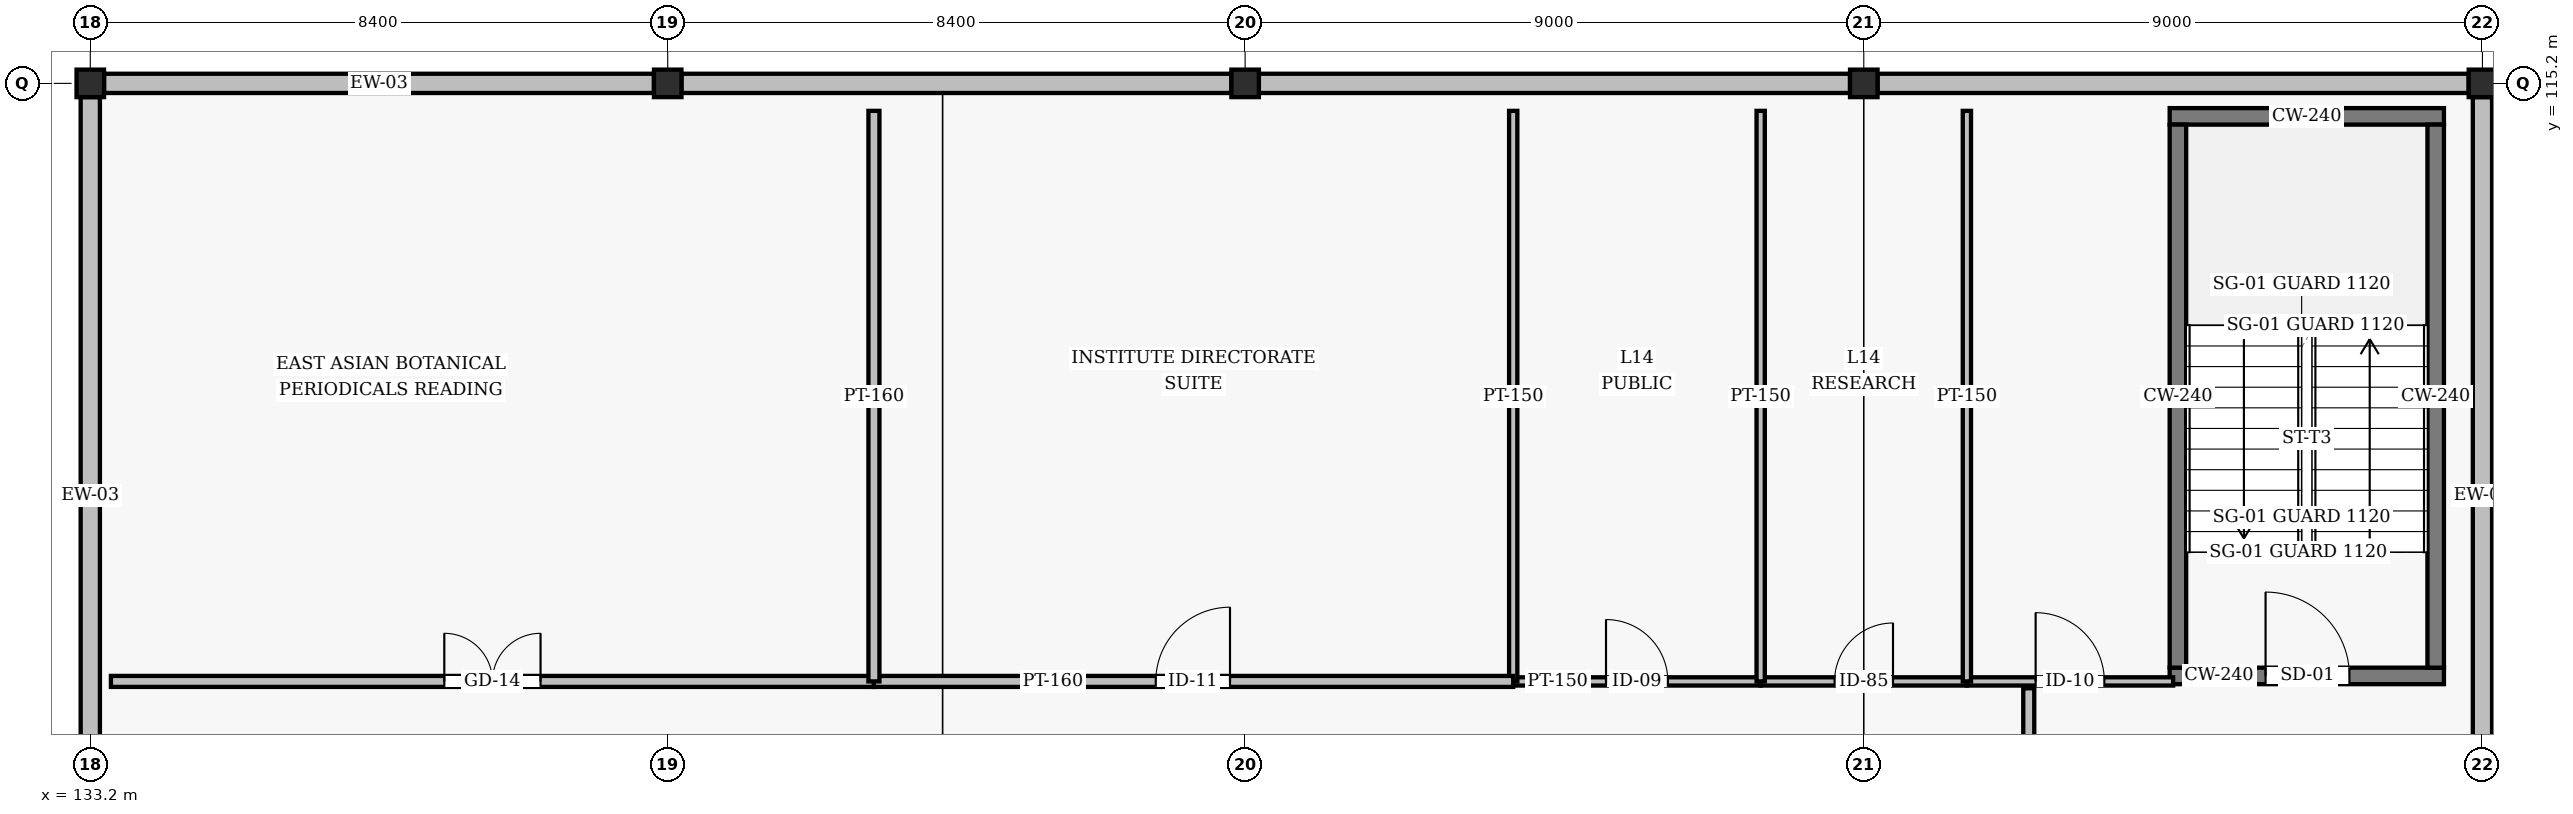
"""IFC4 building model, lengths in metres.
Left out: names, types, materials, properties, quantities, classifications, styles, units other than length and angle.
Written with IfcOpenShell. Run it as: python <this file> out.ifc"""

import sys

from ifc_helpers import new_model, si_unit, direction, frame, frame_2d, origin, origin_2d, place, context, subcontext, project, spatial, rectangle, hollow_rectangle, extrude, element, fill, save


model = new_model("IFC4")
c1 = context("Model", 3, precision=1e-05, world=origin(), true_north=direction((0.0, 1.0)))
c2 = subcontext(c1, "Body", "Model", "MODEL_VIEW")
j1 = project(units=[si_unit("LENGTHUNIT", "METRE"), si_unit("PLANEANGLEUNIT", "RADIAN")], contexts=[c1])
p1 = place(None, origin())
s1 = spatial("IfcSite", under=j1, at=p1, CompositionType="ELEMENT")
p2 = place(p1, origin())
s2 = spatial("IfcBuilding", under=s1, at=p2, CompositionType="ELEMENT")
p3 = place(p2, frame((0.0, 0.0, 54.0)))
s3 = spatial("IfcBuildingStorey", under=s2, at=p3, CompositionType="ELEMENT", Elevation=54.0)
for number, where, z_axis, x_axis in (
    (1, (133.2, 115.2, 0.0), (0.0, 0.0, 1.0), (1.0, 0.0, 0.0)),
    (2, (141.6, 115.2, 0.0), (0.0, 0.0, 1.0), (1.0, 0.0, 0.0)),
    (3, (150.0, 115.2, 0.0), (0.0, 0.0, 1.0), (1.0, 0.0, 0.0)),
    (4, (159.0, 115.2, 0.0), (0.0, 0.0, 1.0), (1.0, 0.0, 0.0)),
    (5, (168.0, 115.2, 0.0), (0.0, 0.0, 1.0), (1.0, 0.0, 0.0)),
):
    element("IfcColumn", number, at=place(p3, frame(where, z_axis=z_axis, x_axis=x_axis)), inside=s3, PredefinedType="COLUMN", context=c2, shape_type="SweptSolid", body=[
        extrude(hollow_rectangle(XDim=0.4, YDim=0.4, WallThickness=0.016, InnerFilletRadius=0.016, OuterFilletRadius=0.032, at=origin_2d()), origin(), (0.0, 0.0, 1.0), 3.6),
    ])
p4 = place(p3, frame((168.0, 103.4, 0.0), z_axis=(0.0, 0.0, 1.0), x_axis=(0.0, 1.0, 0.0)))
e6 = element("IfcWall", 6, at=p4, inside=s3, PredefinedType="SOLIDWALL", context=c2, shape_type="SweptSolid", body=[
    extrude(rectangle(XDim=11.6, YDim=0.28, at=frame_2d((5.8, 0.0))), origin(), (0.0, 0.0, 1.0), 2.552),
])
for number, where, z_axis, x_axis in (
    (7, (167.8, 115.2, 0.0), (0.0, 0.0, 1.0), (-1.0, 0.0, 0.0)),
    (8, (158.8, 115.2, 0.0), (0.0, 0.0, 1.0), (-1.0, 0.0, 0.0)),
):
    element("IfcWall", number, at=place(p3, frame(where, z_axis=z_axis, x_axis=x_axis)), inside=s3, PredefinedType="SOLIDWALL", context=c2, shape_type="SweptSolid", body=[
        extrude(rectangle(XDim=8.6, YDim=0.28, at=frame_2d((4.3, 0.0))), origin(), (0.0, 0.0, 1.0), 2.552),
    ])
for number, where, z_axis, x_axis in (
    (9, (149.8, 115.2, 0.0), (0.0, 0.0, 1.0), (-1.0, 0.0, 0.0)),
    (10, (141.4, 115.2, 0.0), (0.0, 0.0, 1.0), (-1.0, 0.0, 0.0)),
):
    element("IfcWall", number, at=place(p3, frame(where, z_axis=z_axis, x_axis=x_axis)), inside=s3, PredefinedType="SOLIDWALL", context=c2, shape_type="SweptSolid", body=[
        extrude(rectangle(XDim=8.0, YDim=0.28, at=frame_2d((4.0, 0.0))), origin(), (0.0, 0.0, 1.0), 2.844),
    ])
p5 = place(p3, frame((133.2, 115.0, 0.0), z_axis=(0.0, 0.0, 1.0), x_axis=(0.0, -1.0, 0.0)))
e11 = element("IfcWall", 11, at=p5, inside=s3, PredefinedType="SOLIDWALL", context=c2, shape_type="SweptSolid", body=[
    extrude(rectangle(XDim=11.6, YDim=0.28, at=frame_2d((5.8, 0.0))), origin(), (0.0, 0.0, 1.0), 2.552),
])
p6 = place(p3, frame((163.45, 106.58, 0.0), z_axis=(0.0, 0.0, 1.0), x_axis=(1.0, 0.0, 0.0)))
e12 = element("IfcWall", 12, at=p6, inside=s3, PredefinedType="SHEAR", context=c2, shape_type="SweptSolid", body=[
    extrude(rectangle(XDim=3.99, YDim=0.24, at=frame_2d((1.995, 0.0))), origin(), (0.0, 0.0, 1.0), 3.344),
])
p7 = place(p6, frame((1.395, 0.0, 0.0)))
e13 = element("IfcOpeningElement", 13, at=p7, cuts=e12, PredefinedType="OPENING", context=c2, shape_type="SweptSolid", body=[
    extrude(rectangle(XDim=1.22, YDim=2.18, at=frame_2d((0.61, 1.09))), frame((0.0, 0.13, 0.0), z_axis=(0.0, -1.0, 0.0), x_axis=(1.0, 0.0, 0.0)), (0.0, 0.0, 1.0), 0.26),
])
p8 = place(p3, frame((163.45, 114.72, 0.0), z_axis=(0.0, 0.0, 1.0), x_axis=(1.0, 0.0, 0.0)))
e14 = element("IfcWall", 14, at=p8, inside=s3, PredefinedType="SHEAR", context=c2, shape_type="SweptSolid", body=[
    extrude(rectangle(XDim=3.99, YDim=0.24, at=frame_2d((1.995, 0.0))), origin(), (0.0, 0.0, 1.0), 3.344),
])
for number, where, z_axis, x_axis in (
    (15, (163.57, 106.7, 0.0), (0.0, 0.0, 1.0), (0.0, 1.0, 0.0)),
    (16, (167.32, 106.7, 0.0), (0.0, 0.0, 1.0), (0.0, 1.0, 0.0)),
):
    element("IfcWall", number, at=place(p3, frame(where, z_axis=z_axis, x_axis=x_axis)), inside=s3, PredefinedType="SHEAR", context=c2, shape_type="SweptSolid", body=[
        extrude(rectangle(XDim=7.9, YDim=0.24, at=frame_2d((3.95, 0.0))), origin(), (0.0, 0.0, 1.0), 3.344),
    ])
p9 = place(p3, frame((153.9, 106.5, 0.0), z_axis=(0.0, 0.0, 1.0), x_axis=(1.0, 0.0, 0.0)))
e17 = element("IfcWall", 17, at=p9, inside=s3, PredefinedType="PARTITIONING", context=c2, shape_type="SweptSolid", body=[
    extrude(rectangle(XDim=3.6, YDim=0.12, at=frame_2d((1.8, 0.0))), origin(), (0.0, 0.0, 1.0), 3.344),
])
p10 = place(p9, frame((1.35, 0.0, 0.0)))
e18 = element("IfcOpeningElement", 18, at=p10, cuts=e17, PredefinedType="OPENING", context=c2, shape_type="SweptSolid", body=[
    extrude(rectangle(XDim=0.9, YDim=2.1, at=frame_2d((0.45, 1.05))), frame((0.0, 0.07, 0.0), z_axis=(0.0, -1.0, 0.0), x_axis=(1.0, 0.0, 0.0)), (0.0, 0.0, 1.0), 0.14),
])
p11 = place(p3, frame((157.5, 106.5, 0.0), z_axis=(0.0, 0.0, 1.0), x_axis=(1.0, 0.0, 0.0)))
e19 = element("IfcWall", 19, at=p11, inside=s3, PredefinedType="PARTITIONING", context=c2, shape_type="SweptSolid", body=[
    extrude(rectangle(XDim=3.0, YDim=0.12, at=frame_2d((1.5, 0.0))), origin(), (0.0, 0.0, 1.0), 2.594),
])
p12 = place(p11, frame((1.075, 0.0, 0.0)))
e20 = element("IfcOpeningElement", 20, at=p12, cuts=e19, PredefinedType="OPENING", context=c2, shape_type="SweptSolid", body=[
    extrude(rectangle(XDim=0.85, YDim=2.1, at=frame_2d((0.425, 1.05))), frame((0.0, 0.07, 0.0), z_axis=(0.0, -1.0, 0.0), x_axis=(1.0, 0.0, 0.0)), (0.0, 0.0, 1.0), 0.14),
])
p13 = place(p3, frame((160.5, 106.5, 0.0), z_axis=(0.0, 0.0, 1.0), x_axis=(1.0, 0.0, 0.0)))
e21 = element("IfcWall", 21, at=p13, inside=s3, PredefinedType="PARTITIONING", context=c2, shape_type="SweptSolid", body=[
    extrude(rectangle(XDim=3.0, YDim=0.12, at=frame_2d((1.5, 0.0))), origin(), (0.0, 0.0, 1.0), 3.344),
])
p14 = place(p13, frame((1.0, 0.0, 0.0)))
e22 = element("IfcOpeningElement", 22, at=p14, cuts=e21, PredefinedType="OPENING", context=c2, shape_type="SweptSolid", body=[
    extrude(rectangle(XDim=1.0, YDim=2.1, at=frame_2d((0.5, 1.05))), frame((0.0, 0.07, 0.0), z_axis=(0.0, -1.0, 0.0), x_axis=(1.0, 0.0, 0.0)), (0.0, 0.0, 1.0), 0.14),
])
for number, where, z_axis, x_axis in (
    (23, (153.9, 106.5, 0.0), (0.0, 0.0, 1.0), (0.0, 1.0, 0.0)),
    (24, (157.5, 106.5, 0.0), (0.0, 0.0, 1.0), (0.0, 1.0, 0.0)),
):
    element("IfcWall", number, at=place(p3, frame(where, z_axis=z_axis, x_axis=x_axis)), inside=s3, PredefinedType="PARTITIONING", context=c2, shape_type="SweptSolid", body=[
        extrude(rectangle(XDim=8.3, YDim=0.12, at=frame_2d((4.15, 0.0))), origin(), (0.0, 0.0, 1.0), 2.944),
    ])
p15 = place(p3, frame((160.5, 106.5, 0.0), z_axis=(0.0, 0.0, 1.0), x_axis=(0.0, 1.0, 0.0)))
e25 = element("IfcWall", 25, at=p15, inside=s3, PredefinedType="PARTITIONING", context=c2, shape_type="SweptSolid", body=[
    extrude(rectangle(XDim=8.3, YDim=0.12, at=frame_2d((4.15, 0.0))), origin(), (0.0, 0.0, 1.0), 3.344),
])
p16 = place(p3, frame((161.4, 92.3, 0.0), z_axis=(0.0, 0.0, 1.0), x_axis=(0.0, 1.0, 0.0)))
e26 = element("IfcWall", 26, at=p16, inside=s3, PredefinedType="PARTITIONING", context=c2, shape_type="SweptSolid", body=[
    extrude(rectangle(XDim=14.1, YDim=0.16, at=frame_2d((7.05, 0.0))), origin(), (0.0, 0.0, 1.0), 2.748),
])
p17 = place(p16, frame((6.5, 0.0, 0.0)))
e27 = element("IfcOpeningElement", 27, at=p17, cuts=e26, PredefinedType="OPENING", context=c2, shape_type="SweptSolid", body=[
    extrude(rectangle(XDim=1.08, YDim=2.08, at=frame_2d((0.54, 1.04))), frame((0.0, 0.09, 0.0), z_axis=(0.0, -1.0, 0.0), x_axis=(1.0, 0.0, 0.0)), (0.0, 0.0, 1.0), 0.18),
])
p18 = place(p3, frame((133.5, 106.5, 0.0), z_axis=(0.0, 0.0, 1.0), x_axis=(1.0, 0.0, 0.0)))
e28 = element("IfcWall", 28, at=p18, inside=s3, PredefinedType="PARTITIONING", context=c2, shape_type="SweptSolid", body=[
    extrude(rectangle(XDim=11.1, YDim=0.16, at=frame_2d((5.55, 0.0))), origin(), (0.0, 0.0, 1.0), 2.594),
])
p19 = place(p18, frame((4.85, 0.0, 0.0)))
e29 = element("IfcOpeningElement", 29, at=p19, cuts=e28, PredefinedType="OPENING", context=c2, shape_type="SweptSolid", body=[
    extrude(rectangle(XDim=1.4, YDim=2.1, at=frame_2d((0.7, 1.05))), frame((0.0, 0.09, 0.0), z_axis=(0.0, -1.0, 0.0), x_axis=(1.0, 0.0, 0.0)), (0.0, 0.0, 1.0), 0.18),
])
p20 = place(p3, frame((144.6, 106.5, 0.0), z_axis=(0.0, 0.0, 1.0), x_axis=(1.0, 0.0, 0.0)))
e30 = element("IfcWall", 30, at=p20, inside=s3, PredefinedType="PARTITIONING", context=c2, shape_type="SweptSolid", body=[
    extrude(rectangle(XDim=9.3, YDim=0.16, at=frame_2d((4.65, 0.0))), origin(), (0.0, 0.0, 1.0), 2.594),
])
p21 = place(p20, frame((4.1, 0.0, 0.0)))
e31 = element("IfcOpeningElement", 31, at=p21, cuts=e30, PredefinedType="OPENING", context=c2, shape_type="SweptSolid", body=[
    extrude(rectangle(XDim=1.08, YDim=2.08, at=frame_2d((0.54, 1.04))), frame((0.0, 0.09, 0.0), z_axis=(0.0, -1.0, 0.0), x_axis=(1.0, 0.0, 0.0)), (0.0, 0.0, 1.0), 0.18),
])
p22 = place(p3, frame((144.6, 106.5, 0.0), z_axis=(0.0, 0.0, 1.0), x_axis=(0.0, 1.0, 0.0)))
e32 = element("IfcWall", 32, at=p22, inside=s3, PredefinedType="PARTITIONING", context=c2, shape_type="SweptSolid", body=[
    extrude(rectangle(XDim=8.3, YDim=0.16, at=frame_2d((4.15, 0.0))), origin(), (0.0, 0.0, 1.0), 2.994),
])
p23 = place(p7, origin())
e33 = element("IfcDoor", 33, at=p23, inside=s3, OperationType="SINGLE_SWING_LEFT", PredefinedType="DOOR", context=c2, shape_type="SweptSolid", body=[
    extrude(rectangle(XDim=1.22, YDim=2.18, at=frame_2d((0.61, 1.09))), frame((0.0, 0.025, 0.0), z_axis=(0.0, -1.0, 0.0), x_axis=(1.0, 0.0, 0.0)), (0.0, 0.0, 1.0), 0.05),
])
fill(e13, e33)
p24 = place(p10, origin())
e34 = element("IfcDoor", 34, at=p24, inside=s3, OperationType="SINGLE_SWING_LEFT", PredefinedType="DOOR", context=c2, shape_type="SweptSolid", body=[
    extrude(rectangle(XDim=0.9, YDim=2.1, at=frame_2d((0.45, 1.05))), frame((0.0, 0.025, 0.0), z_axis=(0.0, -1.0, 0.0), x_axis=(1.0, 0.0, 0.0)), (0.0, 0.0, 1.0), 0.05),
])
fill(e18, e34)
p25 = place(p12, origin())
e35 = element("IfcDoor", 35, at=p25, inside=s3, OperationType="SINGLE_SWING_RIGHT", PredefinedType="DOOR", context=c2, shape_type="SweptSolid", body=[
    extrude(rectangle(XDim=0.85, YDim=2.1, at=frame_2d((0.425, 1.05))), frame((0.0, 0.025, 0.0), z_axis=(0.0, -1.0, 0.0), x_axis=(1.0, 0.0, 0.0)), (0.0, 0.0, 1.0), 0.05),
])
fill(e20, e35)
p26 = place(p14, origin())
e36 = element("IfcDoor", 36, at=p26, inside=s3, OperationType="SINGLE_SWING_LEFT", PredefinedType="DOOR", context=c2, shape_type="SweptSolid", body=[
    extrude(rectangle(XDim=1.0, YDim=2.1, at=frame_2d((0.5, 1.05))), frame((0.0, 0.025, 0.0), z_axis=(0.0, -1.0, 0.0), x_axis=(1.0, 0.0, 0.0)), (0.0, 0.0, 1.0), 0.05),
])
fill(e22, e36)
p27 = place(p19, origin())
e37 = element("IfcDoor", 37, at=p27, inside=s3, OperationType="DOUBLE_DOOR_SINGLE_SWING", PredefinedType="DOOR", context=c2, shape_type="SweptSolid", body=[
    extrude(rectangle(XDim=1.4, YDim=2.1, at=frame_2d((0.7, 1.05))), frame((0.0, 0.025, 0.0), z_axis=(0.0, -1.0, 0.0), x_axis=(1.0, 0.0, 0.0)), (0.0, 0.0, 1.0), 0.05),
])
fill(e29, e37)
p28 = place(p21, origin())
e38 = element("IfcDoor", 38, at=p28, inside=s3, OperationType="SINGLE_SWING_RIGHT", PredefinedType="DOOR", context=c2, shape_type="SweptSolid", body=[
    extrude(rectangle(XDim=1.08, YDim=2.08, at=frame_2d((0.54, 1.04))), frame((0.0, 0.025, 0.0), z_axis=(0.0, -1.0, 0.0), x_axis=(1.0, 0.0, 0.0)), (0.0, 0.0, 1.0), 0.05),
])
fill(e31, e38)
save(model, sys.argv[1])
